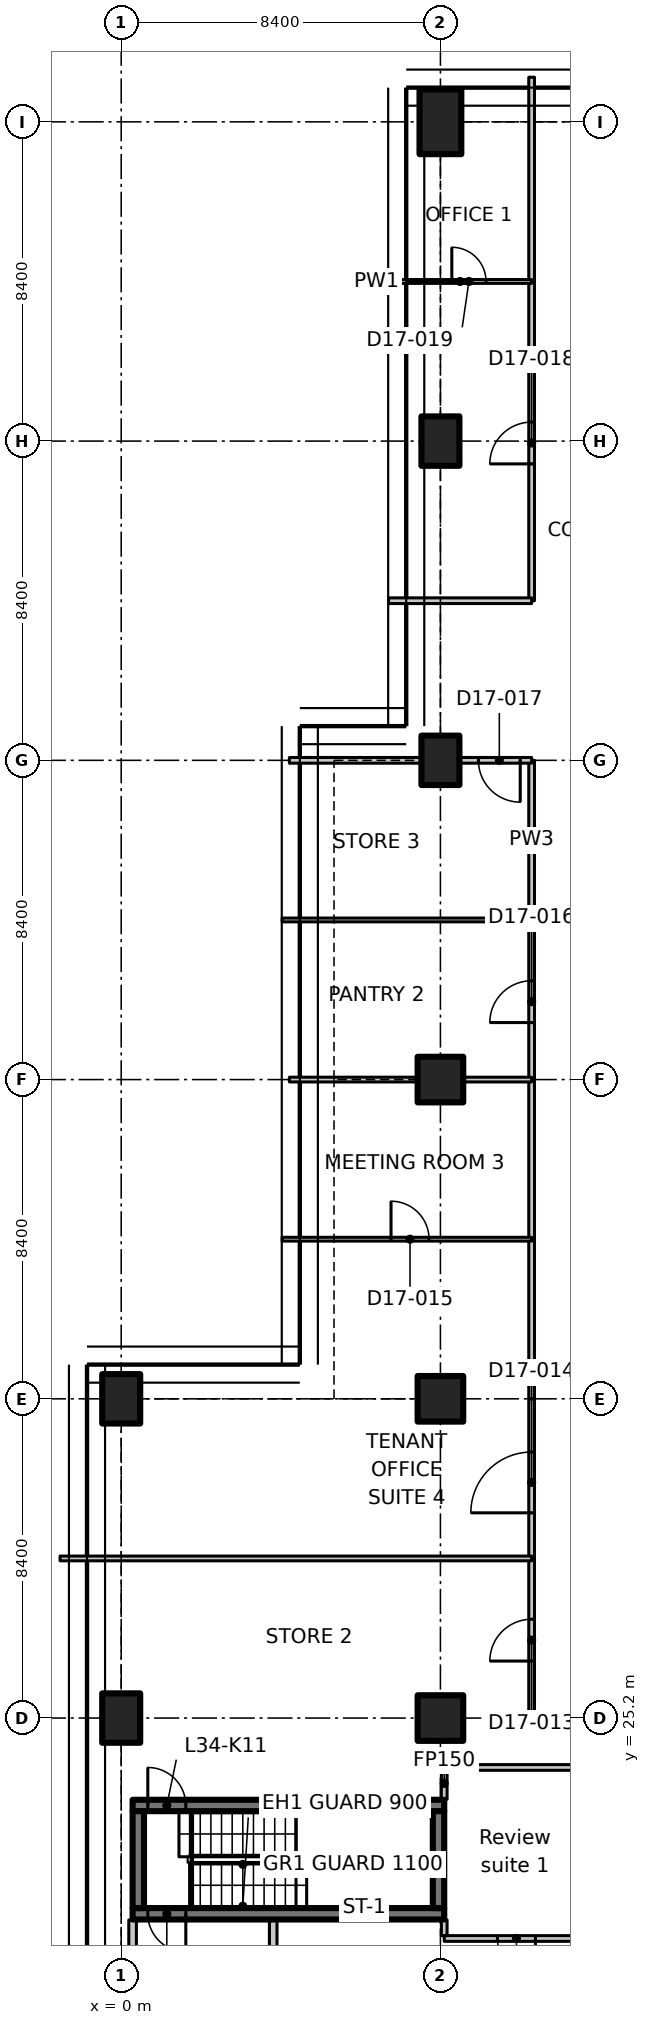
"""IFC4 building model, lengths in metres.
Left out: names, types, materials, properties, quantities, classifications, styles, units other than length and angle.
Written with IfcOpenShell. Run it as: python <this file> out.ifc"""

import sys

from ifc_helpers import new_model, si_unit, direction, frame, frame_2d, origin, origin_2d, place, context, subcontext, project, spatial, polyline, rectangle, outline, extrude, element, fill, save


model = new_model("IFC4")
c1 = context("Model", 3, precision=1e-05, world=origin(), true_north=direction((0.0, 1.0)))
c2 = subcontext(c1, "Body", "Model", "MODEL_VIEW")
j1 = project(units=[si_unit("LENGTHUNIT", "METRE"), si_unit("PLANEANGLEUNIT", "RADIAN")], contexts=[c1])
p1 = place(None, origin())
s1 = spatial("IfcSite", under=j1, at=p1, CompositionType="ELEMENT")
p2 = place(p1, origin())
s2 = spatial("IfcBuilding", under=s1, at=p2, CompositionType="ELEMENT")
p3 = place(p2, frame((0.0, 0.0, 138.5)))
s3 = spatial("IfcBuildingStorey", under=s2, at=p3, CompositionType="ELEMENT", Elevation=138.5)
for number, where, z_axis, x_axis in (
    (1, (0.0, 25.2, 0.0), (0.0, 0.0, 1.0), (1.0, 0.0, 0.0)),
    (2, (0.0, 33.6, 0.0), (0.0, 0.0, 1.0), (1.0, 0.0, 0.0)),
):
    element("IfcColumn", number, at=place(p3, frame(where, z_axis=z_axis, x_axis=x_axis)), inside=s3, PredefinedType="COLUMN", context=c2, shape_type="SweptSolid", body=[
        extrude(rectangle(XDim=1.0, YDim=1.3, at=origin_2d()), origin(), (0.0, 0.0, 1.0), 3.35),
    ])
for number, where, z_axis, x_axis in (
    (3, (8.4, 25.2, 0.0), (0.0, 0.0, 1.0), (1.0, 0.0, 0.0)),
    (4, (8.4, 33.6, 0.0), (0.0, 0.0, 1.0), (1.0, 0.0, 0.0)),
    (5, (8.4, 42.0, 0.0), (0.0, 0.0, 1.0), (1.0, 0.0, 0.0)),
):
    element("IfcColumn", number, at=place(p3, frame(where, z_axis=z_axis, x_axis=x_axis)), inside=s3, PredefinedType="COLUMN", context=c2, shape_type="SweptSolid", body=[
        extrude(rectangle(XDim=1.2, YDim=1.2, at=origin_2d()), origin(), (0.0, 0.0, 1.0), 3.35),
    ])
for number, where, z_axis, x_axis in (
    (6, (8.4, 50.4, 0.0), (0.0, 0.0, 1.0), (1.0, 0.0, 0.0)),
    (7, (8.4, 58.8, 0.0), (0.0, 0.0, 1.0), (1.0, 0.0, 0.0)),
):
    element("IfcColumn", number, at=place(p3, frame(where, z_axis=z_axis, x_axis=x_axis)), inside=s3, PredefinedType="COLUMN", context=c2, shape_type="SweptSolid", body=[
        extrude(rectangle(XDim=1.0, YDim=1.3, at=origin_2d()), origin(), (0.0, 0.0, 1.0), 3.35),
    ])
p4 = place(p3, frame((8.4, 67.2, 0.0), z_axis=(0.0, 0.0, 1.0), x_axis=(1.0, 0.0, 0.0)))
e8 = element("IfcColumn", 8, at=p4, inside=s3, PredefinedType="COLUMN", context=c2, shape_type="SweptSolid", body=[
    extrude(rectangle(XDim=1.1, YDim=1.7, at=origin_2d()), origin(), (0.0, 0.0, 1.0), 3.35),
])
p5 = place(p3, frame((8.5, 20.05, 0.0), z_axis=(0.0, 0.0, 1.0), x_axis=(-1.0, 0.0, 0.0)))
e9 = element("IfcWall", 9, at=p5, inside=s3, PredefinedType="SHEAR", context=c2, shape_type="SweptSolid", body=[
    extrude(rectangle(XDim=8.2, YDim=0.3, at=frame_2d((4.1, 0.0))), origin(), (0.0, 0.0, 1.0), 3.35),
])
p6 = place(p5, frame((6.8, 0.0, 0.0)))
e10 = element("IfcOpeningElement", 10, at=p6, cuts=e9, PredefinedType="OPENING", context=c2, shape_type="SweptSolid", body=[
    extrude(rectangle(XDim=1.0, YDim=2.1, at=frame_2d((0.5, 1.05))), frame((0.0, 0.16, 0.0), z_axis=(0.0, -1.0, 0.0), x_axis=(1.0, 0.0, 0.0)), (0.0, 0.0, 1.0), 0.32),
])
p7 = place(p3, frame((0.3, 22.9, 0.0), z_axis=(0.0, 0.0, 1.0), x_axis=(1.0, 0.0, 0.0)))
e11 = element("IfcWall", 11, at=p7, inside=s3, PredefinedType="SHEAR", context=c2, shape_type="SweptSolid", body=[
    extrude(rectangle(XDim=8.2, YDim=0.3, at=frame_2d((4.1, 0.0))), origin(), (0.0, 0.0, 1.0), 3.35),
])
p8 = place(p7, frame((0.4, 0.0, 0.0)))
e12 = element("IfcOpeningElement", 12, at=p8, cuts=e11, PredefinedType="OPENING", context=c2, shape_type="SweptSolid", body=[
    extrude(rectangle(XDim=1.0, YDim=2.1, at=frame_2d((0.5, 1.05))), frame((0.0, 0.16, 0.0), z_axis=(0.0, -1.0, 0.0), x_axis=(1.0, 0.0, 0.0)), (0.0, 0.0, 1.0), 0.32),
])
for number, where, z_axis, x_axis in (
    (13, (0.45, 20.2, 0.0), (0.0, 0.0, 1.0), (0.0, 1.0, 0.0)),
    (14, (8.35, 20.2, 0.0), (0.0, 0.0, 1.0), (0.0, 1.0, 0.0)),
):
    element("IfcWall", number, at=place(p3, frame(where, z_axis=z_axis, x_axis=x_axis)), inside=s3, PredefinedType="SHEAR", context=c2, shape_type="SweptSolid", body=[
        extrude(rectangle(XDim=2.55, YDim=0.3, at=frame_2d((1.275, 0.0))), origin(), (0.0, 0.0, 1.0), 3.35),
    ])
p9 = place(p3, frame((0.3, 16.812, 0.0), z_axis=(0.0, 0.0, 1.0), x_axis=(0.0, 1.0, 0.0)))
e15 = element("IfcWall", 15, at=p9, inside=s3, PredefinedType="PARTITIONING", context=c2, shape_type="SweptSolid", body=[
    extrude(rectangle(XDim=3.076, YDim=0.2, at=frame_2d((1.538, 0.0))), origin(), (0.0, 0.0, 1.0), 2.98),
])
p10 = place(p3, frame((4.0, 19.888, 0.0), z_axis=(0.0, 0.0, 1.0), x_axis=(0.0, -1.0, 0.0)))
e16 = element("IfcWall", 16, at=p10, inside=s3, PredefinedType="PARTITIONING", context=c2, shape_type="SweptSolid", body=[
    extrude(rectangle(XDim=3.076, YDim=0.2, at=frame_2d((1.538, 0.0))), origin(), (0.0, 0.0, 1.0), 3.35),
])
p11 = place(p10, frame((1.488, 0.0, 0.0)))
e17 = element("IfcOpeningElement", 17, at=p11, cuts=e16, PredefinedType="OPENING", context=c2, shape_type="SweptSolid", body=[
    extrude(rectangle(XDim=1.0, YDim=2.1, at=frame_2d((0.5, 1.05))), frame((0.0, 0.11, 0.0), z_axis=(0.0, -1.0, 0.0), x_axis=(1.0, 0.0, 0.0)), (0.0, 0.0, 1.0), 0.22),
])
p12 = place(p3, frame((12.3, 19.4, 0.0), z_axis=(0.0, 0.0, 1.0), x_axis=(-1.0, 0.0, 0.0)))
e18 = element("IfcWall", 18, at=p12, inside=s3, PredefinedType="PARTITIONING", context=c2, shape_type="SweptSolid", body=[
    extrude(rectangle(XDim=3.8, YDim=0.15, at=frame_2d((1.9, 0.0))), origin(), (0.0, 0.0, 1.0), 3.35),
])
p13 = place(p12, frame((1.4, 0.0, 0.0)))
e19 = element("IfcOpeningElement", 19, at=p13, cuts=e18, PredefinedType="OPENING", context=c2, shape_type="SweptSolid", body=[
    extrude(rectangle(XDim=1.0, YDim=2.1, at=frame_2d((0.5, 1.05))), frame((0.0, 0.085, 0.0), z_axis=(0.0, -1.0, 0.0), x_axis=(1.0, 0.0, 0.0)), (0.0, 0.0, 1.0), 0.17),
])
p14 = place(p3, frame((8.5, 19.475, 0.0), z_axis=(0.0, 0.0, 1.0), x_axis=(0.0, 1.0, 0.0)))
e20 = element("IfcWall", 20, at=p14, inside=s3, PredefinedType="PARTITIONING", context=c2, shape_type="SweptSolid", body=[
    extrude(rectangle(XDim=0.413, YDim=0.15, at=frame_2d((0.207, 0.0))), origin(), (0.0, 0.0, 1.0), 3.35),
])
p15 = place(p3, frame((8.5, 23.062, 0.0), z_axis=(0.0, 0.0, 1.0), x_axis=(0.0, 1.0, 0.0)))
e21 = element("IfcWall", 21, at=p15, inside=s3, PredefinedType="PARTITIONING", context=c2, shape_type="SweptSolid", body=[
    extrude(rectangle(XDim=0.838, YDim=0.15, at=frame_2d((0.419, 0.0))), origin(), (0.0, 0.0, 1.0), 3.35),
])
p16 = place(p3, frame((8.575, 23.9, 0.0), z_axis=(0.0, 0.0, 1.0), x_axis=(1.0, 0.0, 0.0)))
e22 = element("IfcWall", 22, at=p16, inside=s3, PredefinedType="PARTITIONING", context=c2, shape_type="SweptSolid", body=[
    extrude(rectangle(XDim=3.725, YDim=0.15, at=frame_2d((1.863, 0.0))), origin(), (0.0, 0.0, 1.0), 3.35),
])
p17 = place(p3, frame((10.8, 25.2, 0.0), z_axis=(0.0, 0.0, 1.0), x_axis=(0.0, 1.0, 0.0)))
e23 = element("IfcWall", 23, at=p17, inside=s3, PredefinedType="PARTITIONING", context=c2, shape_type="SweptSolid", body=[
    extrude(rectangle(XDim=4.2, YDim=0.15, at=frame_2d((2.1, 0.0))), origin(), (0.0, 0.0, 1.0), 3.33),
])
p18 = place(p17, frame((1.5, 0.0, 0.0)))
e24 = element("IfcOpeningElement", 24, at=p18, cuts=e23, PredefinedType="OPENING", context=c2, shape_type="SweptSolid", body=[
    extrude(rectangle(XDim=1.1, YDim=2.1, at=frame_2d((0.55, 1.05))), frame((0.0, 0.085, 0.0), z_axis=(0.0, -1.0, 0.0), x_axis=(1.0, 0.0, 0.0)), (0.0, 0.0, 1.0), 0.17),
])
p19 = place(p3, frame((10.8, 29.4, 0.0), z_axis=(0.0, 0.0, 1.0), x_axis=(0.0, 1.0, 0.0)))
e25 = element("IfcWall", 25, at=p19, inside=s3, PredefinedType="PARTITIONING", context=c2, shape_type="SweptSolid", body=[
    extrude(rectangle(XDim=4.2, YDim=0.15, at=frame_2d((2.1, 0.0))), origin(), (0.0, 0.0, 1.0), 3.33),
])
p20 = place(p19, frame((1.2, 0.0, 0.0)))
e26 = element("IfcOpeningElement", 26, at=p20, cuts=e25, PredefinedType="OPENING", context=c2, shape_type="SweptSolid", body=[
    extrude(rectangle(XDim=1.6, YDim=2.1, at=frame_2d((0.8, 1.05))), frame((0.0, 0.085, 0.0), z_axis=(0.0, -1.0, 0.0), x_axis=(1.0, 0.0, 0.0)), (0.0, 0.0, 1.0), 0.17),
])
for number, where, z_axis, x_axis in (
    (27, (10.8, 33.6, 0.0), (0.0, 0.0, 1.0), (0.0, 1.0, 0.0)),
    (28, (10.8, 37.8, 0.0), (0.0, 0.0, 1.0), (0.0, 1.0, 0.0)),
):
    element("IfcWall", number, at=place(p3, frame(where, z_axis=z_axis, x_axis=x_axis)), inside=s3, PredefinedType="PARTITIONING", context=c2, shape_type="SweptSolid", body=[
        extrude(rectangle(XDim=4.2, YDim=0.15, at=frame_2d((2.1, 0.0))), origin(), (0.0, 0.0, 1.0), 3.33),
    ])
p21 = place(p3, frame((10.8, 42.0, 0.0), z_axis=(0.0, 0.0, 1.0), x_axis=(0.0, 1.0, 0.0)))
e29 = element("IfcWall", 29, at=p21, inside=s3, PredefinedType="PARTITIONING", context=c2, shape_type="SweptSolid", body=[
    extrude(rectangle(XDim=4.2, YDim=0.15, at=frame_2d((2.1, 0.0))), origin(), (0.0, 0.0, 1.0), 3.33),
])
p22 = place(p21, frame((1.5, 0.0, 0.0)))
e30 = element("IfcOpeningElement", 30, at=p22, cuts=e29, PredefinedType="OPENING", context=c2, shape_type="SweptSolid", body=[
    extrude(rectangle(XDim=1.1, YDim=2.1, at=frame_2d((0.55, 1.05))), frame((0.0, 0.085, 0.0), z_axis=(0.0, -1.0, 0.0), x_axis=(1.0, 0.0, 0.0)), (0.0, 0.0, 1.0), 0.17),
])
p23 = place(p3, frame((10.8, 46.2, 0.0), z_axis=(0.0, 0.0, 1.0), x_axis=(0.0, 1.0, 0.0)))
e31 = element("IfcWall", 31, at=p23, inside=s3, PredefinedType="PARTITIONING", context=c2, shape_type="SweptSolid", body=[
    extrude(rectangle(XDim=4.2, YDim=0.15, at=frame_2d((2.1, 0.0))), origin(), (0.0, 0.0, 1.0), 3.33),
])
p24 = place(p3, frame((10.8, 54.6, 0.0), z_axis=(0.0, 0.0, 1.0), x_axis=(0.0, 1.0, 0.0)))
e32 = element("IfcWall", 32, at=p24, inside=s3, PredefinedType="PARTITIONING", context=c2, shape_type="SweptSolid", body=[
    extrude(rectangle(XDim=8.4, YDim=0.15, at=frame_2d((4.2, 0.0))), origin(), (0.0, 0.0, 1.0), 3.33),
])
p25 = place(p24, frame((3.6, 0.0, 0.0)))
e33 = element("IfcOpeningElement", 33, at=p25, cuts=e32, PredefinedType="OPENING", context=c2, shape_type="SweptSolid", body=[
    extrude(rectangle(XDim=1.1, YDim=2.1, at=frame_2d((0.55, 1.05))), frame((0.0, 0.085, 0.0), z_axis=(0.0, -1.0, 0.0), x_axis=(1.0, 0.0, 0.0)), (0.0, 0.0, 1.0), 0.17),
])
p26 = place(p3, frame((10.8, 63.0, 0.0), z_axis=(0.0, 0.0, 1.0), x_axis=(0.0, 1.0, 0.0)))
e34 = element("IfcWall", 34, at=p26, inside=s3, PredefinedType="PARTITIONING", context=c2, shape_type="SweptSolid", body=[
    extrude(outline(polyline([(0.0, 0.0), (5.374, 0.0), (5.374, 3.33), (5.28, 3.33), (4.65, 3.33), (4.648, 2.98), (3.752, 2.98), (3.75, 3.33), (0.0, 3.33), (0.0, 0.0)])), frame((0.0, 0.075, 0.0), z_axis=(0.0, -1.0, 0.0), x_axis=(1.0, 0.0, 0.0)), (0.0, 0.0, 1.0), 0.15),
])
p27 = place(p3, frame((10.8, 50.4, 0.0), z_axis=(0.0, 0.0, 1.0), x_axis=(-1.0, 0.0, 0.0)))
e35 = element("IfcWall", 35, at=p27, inside=s3, PredefinedType="PARTITIONING", context=c2, shape_type="SweptSolid", body=[
    extrude(rectangle(XDim=1.88, YDim=0.15, at=frame_2d((0.94, 0.0))), origin(), (0.0, 0.0, 1.0), 3.33),
])
p28 = place(p27, frame((0.3, 0.0, 0.0)))
e36 = element("IfcOpeningElement", 36, at=p28, cuts=e35, PredefinedType="OPENING", context=c2, shape_type="SweptSolid", body=[
    extrude(rectangle(XDim=1.1, YDim=2.1, at=frame_2d((0.55, 1.05))), frame((0.0, 0.085, 0.0), z_axis=(0.0, -1.0, 0.0), x_axis=(1.0, 0.0, 0.0)), (0.0, 0.0, 1.0), 0.17),
])
p29 = place(p3, frame((7.88, 50.4, 0.0), z_axis=(0.0, 0.0, 1.0), x_axis=(-1.0, 0.0, 0.0)))
e37 = element("IfcWall", 37, at=p29, inside=s3, PredefinedType="PARTITIONING", context=c2, shape_type="SweptSolid", body=[
    extrude(rectangle(XDim=3.454, YDim=0.15, at=frame_2d((1.727, 0.0))), origin(), (0.0, 0.0, 1.0), 2.98),
])
p30 = place(p3, frame((7.035, 54.6, 0.0), z_axis=(0.0, 0.0, 1.0), x_axis=(1.0, 0.0, 0.0)))
e38 = element("IfcWall", 38, at=p30, inside=s3, PredefinedType="PARTITIONING", context=c2, shape_type="SweptSolid", body=[
    extrude(rectangle(XDim=3.765, YDim=0.15, at=frame_2d((1.883, 0.0))), origin(), (0.0, 0.0, 1.0), 2.98),
])
p31 = place(p3, frame((-1.609, 29.4, 0.0), z_axis=(0.0, 0.0, 1.0), x_axis=(1.0, 0.0, 0.0)))
e39 = element("IfcWall", 39, at=p31, inside=s3, PredefinedType="PARTITIONING", context=c2, shape_type="SweptSolid", body=[
    extrude(outline(polyline([(0.0, 0.0), (12.409, 0.0), (12.409, 3.33), (2.059, 3.33), (2.057, 2.98), (1.161, 2.98), (1.159, 3.33), (0.509, 3.33), (0.0, 3.33), (0.0, 0.0)])), frame((0.0, 0.062, 0.0), z_axis=(0.0, -1.0, 0.0), x_axis=(1.0, 0.0, 0.0)), (0.0, 0.0, 1.0), 0.125),
])
p32 = place(p3, frame((4.235, 37.8, 0.0), z_axis=(0.0, 0.0, 1.0), x_axis=(1.0, 0.0, 0.0)))
e40 = element("IfcWall", 40, at=p32, inside=s3, PredefinedType="PARTITIONING", context=c2, shape_type="SweptSolid", body=[
    extrude(outline(polyline([(0.0, 0.0), (6.565, 0.0), (6.565, 3.33), (1.815, 3.33), (1.813, 2.98), (0.917, 2.98), (0.915, 3.33), (0.265, 3.33), (0.0, 3.33), (0.0, 0.0)])), frame((0.0, 0.05, 0.0), z_axis=(0.0, -1.0, 0.0), x_axis=(1.0, 0.0, 0.0)), (0.0, 0.0, 1.0), 0.1),
])
p33 = place(p32, frame((2.865, 0.0, 0.0)))
e41 = element("IfcOpeningElement", 41, at=p33, cuts=e40, PredefinedType="OPENING", context=c2, shape_type="SweptSolid", body=[
    extrude(rectangle(XDim=1.0, YDim=2.1, at=frame_2d((0.5, 1.05))), frame((0.0, 0.06, 0.0), z_axis=(0.0, -1.0, 0.0), x_axis=(1.0, 0.0, 0.0)), (0.0, 0.0, 1.0), 0.12),
])
p34 = place(p3, frame((4.426, 42.0, 0.0), z_axis=(0.0, 0.0, 1.0), x_axis=(1.0, 0.0, 0.0)))
e42 = element("IfcWall", 42, at=p34, inside=s3, PredefinedType="PARTITIONING", context=c2, shape_type="SweptSolid", body=[
    extrude(rectangle(XDim=3.354, YDim=0.125, at=frame_2d((1.677, 0.0))), origin(), (0.0, 0.0, 1.0), 2.98),
])
p35 = place(p3, frame((9.02, 42.0, 0.0), z_axis=(0.0, 0.0, 1.0), x_axis=(1.0, 0.0, 0.0)))
e43 = element("IfcWall", 43, at=p35, inside=s3, PredefinedType="PARTITIONING", context=c2, shape_type="SweptSolid", body=[
    extrude(rectangle(XDim=1.78, YDim=0.125, at=frame_2d((0.89, 0.0))), origin(), (0.0, 0.0, 1.0), 3.33),
])
p36 = place(p3, frame((4.235, 46.2, 0.0), z_axis=(0.0, 0.0, 1.0), x_axis=(1.0, 0.0, 0.0)))
e44 = element("IfcWall", 44, at=p36, inside=s3, PredefinedType="PARTITIONING", context=c2, shape_type="SweptSolid", body=[
    extrude(outline(polyline([(0.0, 0.0), (6.565, 0.0), (6.565, 3.33), (1.815, 3.33), (1.813, 2.98), (0.917, 2.98), (0.915, 3.33), (0.265, 3.33), (0.0, 3.33), (0.0, 0.0)])), frame((0.0, 0.05, 0.0), z_axis=(0.0, -1.0, 0.0), x_axis=(1.0, 0.0, 0.0)), (0.0, 0.0, 1.0), 0.1),
])
p37 = place(p3, frame((7.035, 63.0, 0.0), z_axis=(0.0, 0.0, 1.0), x_axis=(1.0, 0.0, 0.0)))
e45 = element("IfcWall", 45, at=p37, inside=s3, PredefinedType="PARTITIONING", context=c2, shape_type="SweptSolid", body=[
    extrude(rectangle(XDim=3.765, YDim=0.1, at=frame_2d((1.883, 0.0))), origin(), (0.0, 0.0, 1.0), 2.98),
])
p38 = place(p37, frame((1.665, 0.0, 0.0)))
e46 = element("IfcOpeningElement", 46, at=p38, cuts=e45, PredefinedType="OPENING", context=c2, shape_type="SweptSolid", body=[
    extrude(rectangle(XDim=0.9, YDim=2.1, at=frame_2d((0.45, 1.05))), frame((0.0, 0.06, 0.0), z_axis=(0.0, -1.0, 0.0), x_axis=(1.0, 0.0, 0.0)), (0.0, 0.0, 1.0), 0.12),
])
p39 = place(p6, origin())
e47 = element("IfcDoor", 47, at=p39, inside=s3, OperationType="SINGLE_SWING_RIGHT", PredefinedType="DOOR", context=c2, shape_type="SweptSolid", body=[
    extrude(rectangle(XDim=1.0, YDim=2.1, at=frame_2d((0.5, 1.05))), frame((0.0, 0.025, 0.0), z_axis=(0.0, -1.0, 0.0), x_axis=(1.0, 0.0, 0.0)), (0.0, 0.0, 1.0), 0.05),
])
fill(e10, e47)
p40 = place(p8, origin())
e48 = element("IfcDoor", 48, at=p40, inside=s3, OperationType="SINGLE_SWING_LEFT", PredefinedType="DOOR", context=c2, shape_type="SweptSolid", body=[
    extrude(rectangle(XDim=1.0, YDim=2.1, at=frame_2d((0.5, 1.05))), frame((0.0, 0.025, 0.0), z_axis=(0.0, -1.0, 0.0), x_axis=(1.0, 0.0, 0.0)), (0.0, 0.0, 1.0), 0.05),
])
fill(e12, e48)
p41 = place(p13, origin())
e49 = element("IfcDoor", 49, at=p41, inside=s3, OperationType="SINGLE_SWING_LEFT", PredefinedType="DOOR", context=c2, shape_type="SweptSolid", body=[
    extrude(rectangle(XDim=1.0, YDim=2.1, at=frame_2d((0.5, 1.05))), frame((0.0, 0.025, 0.0), z_axis=(0.0, -1.0, 0.0), x_axis=(1.0, 0.0, 0.0)), (0.0, 0.0, 1.0), 0.05),
])
fill(e19, e49)
p42 = place(p18, origin())
e50 = element("IfcDoor", 50, at=p42, inside=s3, OperationType="SINGLE_SWING_LEFT", PredefinedType="DOOR", context=c2, shape_type="SweptSolid", body=[
    extrude(rectangle(XDim=1.1, YDim=2.1, at=frame_2d((0.55, 1.05))), frame((0.0, 0.025, 0.0), z_axis=(0.0, -1.0, 0.0), x_axis=(1.0, 0.0, 0.0)), (0.0, 0.0, 1.0), 0.05),
])
fill(e24, e50)
p43 = place(p20, origin())
e51 = element("IfcDoor", 51, at=p43, inside=s3, OperationType="DOUBLE_DOOR_SINGLE_SWING", PredefinedType="DOOR", context=c2, shape_type="SweptSolid", body=[
    extrude(rectangle(XDim=1.6, YDim=2.1, at=frame_2d((0.8, 1.05))), frame((0.0, 0.025, 0.0), z_axis=(0.0, -1.0, 0.0), x_axis=(1.0, 0.0, 0.0)), (0.0, 0.0, 1.0), 0.05),
])
fill(e26, e51)
p44 = place(p33, origin())
e52 = element("IfcDoor", 52, at=p44, inside=s3, OperationType="SINGLE_SWING_LEFT", PredefinedType="DOOR", context=c2, shape_type="SweptSolid", body=[
    extrude(rectangle(XDim=1.0, YDim=2.1, at=frame_2d((0.5, 1.05))), frame((0.0, 0.025, 0.0), z_axis=(0.0, -1.0, 0.0), x_axis=(1.0, 0.0, 0.0)), (0.0, 0.0, 1.0), 0.05),
])
fill(e41, e52)
p45 = place(p22, origin())
e53 = element("IfcDoor", 53, at=p45, inside=s3, OperationType="SINGLE_SWING_LEFT", PredefinedType="DOOR", context=c2, shape_type="SweptSolid", body=[
    extrude(rectangle(XDim=1.1, YDim=2.1, at=frame_2d((0.55, 1.05))), frame((0.0, 0.025, 0.0), z_axis=(0.0, -1.0, 0.0), x_axis=(1.0, 0.0, 0.0)), (0.0, 0.0, 1.0), 0.05),
])
fill(e30, e53)
p46 = place(p28, origin())
e54 = element("IfcDoor", 54, at=p46, inside=s3, OperationType="SINGLE_SWING_LEFT", PredefinedType="DOOR", context=c2, shape_type="SweptSolid", body=[
    extrude(rectangle(XDim=1.1, YDim=2.1, at=frame_2d((0.55, 1.05))), frame((0.0, 0.025, 0.0), z_axis=(0.0, -1.0, 0.0), x_axis=(1.0, 0.0, 0.0)), (0.0, 0.0, 1.0), 0.05),
])
fill(e36, e54)
p47 = place(p25, origin())
e55 = element("IfcDoor", 55, at=p47, inside=s3, OperationType="SINGLE_SWING_LEFT", PredefinedType="DOOR", context=c2, shape_type="SweptSolid", body=[
    extrude(rectangle(XDim=1.1, YDim=2.1, at=frame_2d((0.55, 1.05))), frame((0.0, 0.025, 0.0), z_axis=(0.0, -1.0, 0.0), x_axis=(1.0, 0.0, 0.0)), (0.0, 0.0, 1.0), 0.05),
])
fill(e33, e55)
p48 = place(p38, origin())
e56 = element("IfcDoor", 56, at=p48, inside=s3, OperationType="SINGLE_SWING_LEFT", PredefinedType="DOOR", context=c2, shape_type="SweptSolid", body=[
    extrude(rectangle(XDim=0.9, YDim=2.1, at=frame_2d((0.45, 1.05))), frame((0.0, 0.025, 0.0), z_axis=(0.0, -1.0, 0.0), x_axis=(1.0, 0.0, 0.0)), (0.0, 0.0, 1.0), 0.05),
])
fill(e46, e56)
save(model, sys.argv[1])
